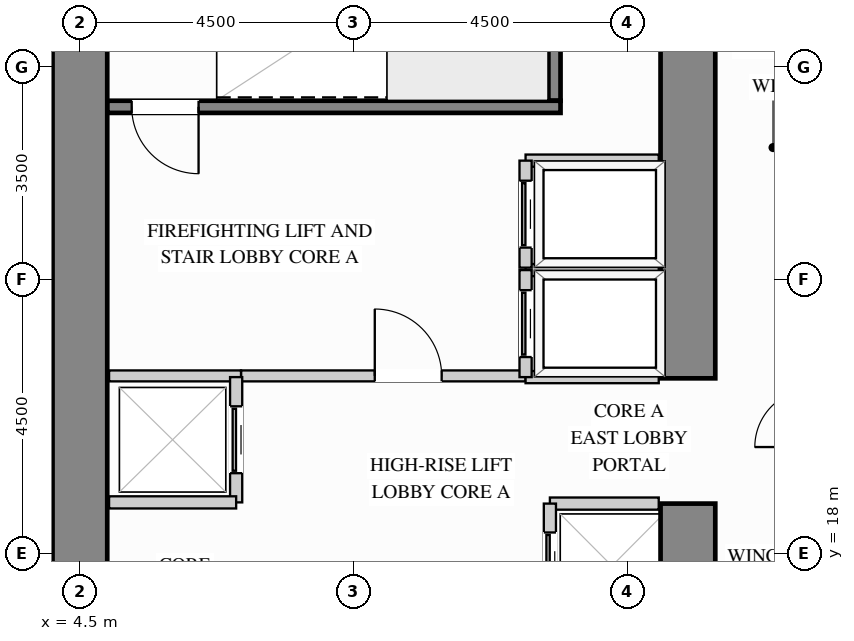
"""IFC4 building model, lengths in metres.
Left out: names, types, materials, properties, quantities, classifications, styles, units other than length and angle.
Written with IfcOpenShell. Run it as: python <this file> out.ifc"""

import sys

from ifc_helpers import new_model, si_unit, direction, frame, frame_2d, origin, place, context, subcontext, project, spatial, rectangle, extrude, source, transform, mapped, element, fill, save


model = new_model("IFC4")
c1 = context("Model", 3, precision=1e-05, world=origin(), true_north=direction((0.0, 1.0)))
c2 = subcontext(c1, "Body", "Model", "MODEL_VIEW")
j1 = project(units=[si_unit("LENGTHUNIT", "METRE"), si_unit("PLANEANGLEUNIT", "RADIAN")], contexts=[c1])
p1 = place(None, origin())
s1 = spatial("IfcSite", under=j1, at=p1, CompositionType="ELEMENT")
p2 = place(p1, origin())
s2 = spatial("IfcBuilding", under=s1, at=p2, CompositionType="ELEMENT")
p3 = place(p2, frame((0.0, 0.0, 58.5)))
s3 = spatial("IfcBuildingStorey", under=s2, at=p3, CompositionType="ELEMENT", Elevation=58.5)
m1 = source(origin(), c2, "Body", "SweptSolid", [
    extrude(rectangle(XDim=9.87, YDim=0.9, at=frame_2d((4.935, 0.0))), origin(), (0.0, 0.0, 1.0), 3.38),
])
p4 = place(p3, frame((14.5, 8.95, 0.0), z_axis=(0.0, 0.0, 1.0), x_axis=(0.0, 1.0, 0.0)))
e1 = element("IfcWall", 1, at=p4, inside=s3, PredefinedType="SHEAR", context=c2, shape_type="MappedRepresentation", body=[
    mapped(m1, transform((0.0, 0.0, 0.0), x_axis=(1.0, 0.0, 0.0), y_axis=(0.0, 1.0, 0.0), z_axis=(0.0, 0.0, 1.0))),
])
m2 = source(origin(), c2, "Body", "SweptSolid", [
    extrude(rectangle(XDim=8.17, YDim=0.9, at=frame_2d((4.085, 0.0))), origin(), (0.0, 0.0, 1.0), 3.38),
])
p5 = place(p3, frame((14.5, 20.88, 0.0), z_axis=(0.0, 0.0, 1.0), x_axis=(0.0, 1.0, 0.0)))
e2 = element("IfcWall", 2, at=p5, inside=s3, PredefinedType="SHEAR", context=c2, shape_type="MappedRepresentation", body=[
    mapped(m2, transform((0.0, 0.0, 0.0), x_axis=(1.0, 0.0, 0.0), y_axis=(0.0, 1.0, 0.0), z_axis=(0.0, 0.0, 1.0))),
])
m3 = source(origin(), c2, "Body", "SweptSolid", [
    extrude(rectangle(XDim=20.1, YDim=0.9, at=frame_2d((10.05, 0.0))), origin(), (0.0, 0.0, 1.0), 3.38),
])
p6 = place(p3, frame((4.5, 8.95, 0.0), z_axis=(0.0, 0.0, 1.0), x_axis=(0.0, 1.0, 0.0)))
e3 = element("IfcWall", 3, at=p6, inside=s3, PredefinedType="SHEAR", context=c2, shape_type="MappedRepresentation", body=[
    mapped(m3, transform((0.0, 0.0, 0.0), x_axis=(1.0, 0.0, 0.0), y_axis=(0.0, 1.0, 0.0), z_axis=(0.0, 0.0, 1.0))),
])
p7 = place(p3, frame((7.15, 20.92, 0.0), z_axis=(0.0, 0.0, 1.0), x_axis=(1.0, 0.0, 0.0)))
e4 = element("IfcWall", 4, at=p7, inside=s3, PredefinedType="PARTITIONING", context=c2, shape_type="SweptSolid", body=[
    extrude(rectangle(XDim=4.68, YDim=0.18, at=frame_2d((2.34, 0.0))), origin(), (0.0, 0.0, 1.0), 3.365),
])
p8 = place(p7, frame((2.2, 0.0, 0.0)))
e5 = element("IfcOpeningElement", 5, at=p8, cuts=e4, PredefinedType="OPENING", context=c2, shape_type="SweptSolid", body=[
    extrude(rectangle(XDim=1.1, YDim=2.15, at=frame_2d((0.55, 1.075))), frame((0.0, 0.1, 0.0), z_axis=(0.0, -1.0, 0.0), x_axis=(1.0, 0.0, 0.0)), (0.0, 0.0, 1.0), 0.2),
])
m4 = source(origin(), c2, "Body", "SweptSolid", [
    extrude(rectangle(XDim=2.17, YDim=0.18, at=frame_2d((1.085, 0.0))), origin(), (0.0, 0.0, 1.0), 3.365),
])
p9 = place(p3, frame((4.98, 20.92, 0.0), z_axis=(0.0, 0.0, 1.0), x_axis=(1.0, 0.0, 0.0)))
e6 = element("IfcWall", 6, at=p9, inside=s3, PredefinedType="PARTITIONING", context=c2, shape_type="MappedRepresentation", body=[
    mapped(m4, transform((0.0, 0.0, 0.0), x_axis=(1.0, 0.0, 0.0), y_axis=(0.0, 1.0, 0.0), z_axis=(0.0, 0.0, 1.0))),
])
m5 = source(origin(), c2, "Body", "SweptSolid", [
    extrude(rectangle(XDim=2.19, YDim=0.2, at=frame_2d((1.095, 0.0))), origin(), (0.0, 0.0, 1.0), 3.365),
])
for number, where, z_axis, x_axis in (
    (7, (11.83, 22.66, 0.0), (0.0, 0.0, 1.0), (1.0, 0.0, 0.0)),
    (8, (11.83, 20.9, 0.0), (0.0, 0.0, 1.0), (1.0, 0.0, 0.0)),
):
    element("IfcWall", number, at=place(p3, frame(where, z_axis=z_axis, x_axis=x_axis)), inside=s3, PredefinedType="PARTITIONING", context=c2, shape_type="MappedRepresentation", body=[
        mapped(m5, transform((0.0, 0.0, 0.0), x_axis=(1.0, 0.0, 0.0), y_axis=(0.0, 1.0, 0.0), z_axis=(0.0, 0.0, 1.0))),
    ])
p10 = place(p3, frame((11.83, 20.9, 0.0), z_axis=(0.0, 0.0, 1.0), x_axis=(0.0, 1.0, 0.0)))
e9 = element("IfcWall", 9, at=p10, inside=s3, PredefinedType="PARTITIONING", context=c2, shape_type="SweptSolid", body=[
    extrude(rectangle(XDim=1.76, YDim=0.2, at=frame_2d((0.88, 0.0))), origin(), (0.0, 0.0, 1.0), 3.365),
])
p11 = place(p10, frame((0.33, 0.0, 0.0)))
e10 = element("IfcOpeningElement", 10, at=p11, cuts=e9, PredefinedType="OPENING", context=c2, shape_type="SweptSolid", body=[
    extrude(rectangle(XDim=1.1, YDim=2.2, at=frame_2d((0.55, 1.1))), frame((0.0, 0.11, 0.0), z_axis=(0.0, -1.0, 0.0), x_axis=(1.0, 0.0, 0.0)), (0.0, 0.0, 1.0), 0.22),
])
p12 = place(p3, frame((11.83, 24.46, 0.0), z_axis=(0.0, 0.0, 1.0), x_axis=(1.0, 0.0, 0.0)))
e11 = element("IfcWall", 11, at=p12, inside=s3, PredefinedType="PARTITIONING", context=c2, shape_type="MappedRepresentation", body=[
    mapped(m5, transform((0.0, 0.0, 0.0), x_axis=(1.0, 0.0, 0.0), y_axis=(0.0, 1.0, 0.0), z_axis=(0.0, 0.0, 1.0))),
])
p13 = place(p3, frame((11.83, 22.7, 0.0), z_axis=(0.0, 0.0, 1.0), x_axis=(0.0, 1.0, 0.0)))
e12 = element("IfcWall", 12, at=p13, inside=s3, PredefinedType="PARTITIONING", context=c2, shape_type="SweptSolid", body=[
    extrude(rectangle(XDim=1.76, YDim=0.2, at=frame_2d((0.88, 0.0))), origin(), (0.0, 0.0, 1.0), 3.365),
])
p14 = place(p13, frame((0.33, 0.0, 0.0)))
e13 = element("IfcOpeningElement", 13, at=p14, cuts=e12, PredefinedType="OPENING", context=c2, shape_type="SweptSolid", body=[
    extrude(rectangle(XDim=1.1, YDim=2.2, at=frame_2d((0.55, 1.1))), frame((0.0, 0.11, 0.0), z_axis=(0.0, -1.0, 0.0), x_axis=(1.0, 0.0, 0.0)), (0.0, 0.0, 1.0), 0.22),
])
m6 = source(origin(), c2, "Body", "SweptSolid", [
    extrude(rectangle(XDim=1.79, YDim=0.2, at=frame_2d((0.895, 0.0))), origin(), (0.0, 0.0, 1.0), 3.365),
])
p15 = place(p3, frame((12.23, 18.82, 0.0), z_axis=(0.0, 0.0, 1.0), x_axis=(1.0, 0.0, 0.0)))
e14 = element("IfcWall", 14, at=p15, inside=s3, PredefinedType="PARTITIONING", context=c2, shape_type="MappedRepresentation", body=[
    mapped(m6, transform((0.0, 0.0, 0.0), x_axis=(1.0, 0.0, 0.0), y_axis=(0.0, 1.0, 0.0), z_axis=(0.0, 0.0, 1.0))),
])
p16 = place(p3, frame((12.23, 16.77, 0.0), z_axis=(0.0, 0.0, 1.0), x_axis=(0.0, 1.0, 0.0)))
e15 = element("IfcWall", 15, at=p16, inside=s3, PredefinedType="PARTITIONING", context=c2, shape_type="SweptSolid", body=[
    extrude(rectangle(XDim=2.05, YDim=0.2, at=frame_2d((1.025, 0.0))), origin(), (0.0, 0.0, 1.0), 3.365),
])
p17 = place(p16, frame((0.475, 0.0, 0.0)))
e16 = element("IfcOpeningElement", 16, at=p17, cuts=e15, PredefinedType="OPENING", context=c2, shape_type="SweptSolid", body=[
    extrude(rectangle(XDim=1.1, YDim=2.2, at=frame_2d((0.55, 1.1))), frame((0.0, 0.11, 0.0), z_axis=(0.0, -1.0, 0.0), x_axis=(1.0, 0.0, 0.0)), (0.0, 0.0, 1.0), 0.22),
])
p18 = place(p3, frame((7.07, 18.84, 0.0), z_axis=(0.0, 0.0, 1.0), x_axis=(0.0, 1.0, 0.0)))
e17 = element("IfcWall", 17, at=p18, inside=s3, PredefinedType="PARTITIONING", context=c2, shape_type="SweptSolid", body=[
    extrude(rectangle(XDim=2.06, YDim=0.2, at=frame_2d((1.03, 0.0))), origin(), (0.0, 0.0, 1.0), 3.365),
])
p19 = place(p18, frame((0.48, 0.0, 0.0)))
e18 = element("IfcOpeningElement", 18, at=p19, cuts=e17, PredefinedType="OPENING", context=c2, shape_type="SweptSolid", body=[
    extrude(rectangle(XDim=1.1, YDim=2.2, at=frame_2d((0.55, 1.1))), frame((0.0, 0.11, 0.0), z_axis=(0.0, -1.0, 0.0), x_axis=(1.0, 0.0, 0.0)), (0.0, 0.0, 1.0), 0.22),
])
m7 = source(origin(), c2, "Body", "SweptSolid", [
    extrude(rectangle(XDim=2.09, YDim=0.2, at=frame_2d((1.045, 0.0))), origin(), (0.0, 0.0, 1.0), 3.365),
])
p20 = place(p3, frame((4.98, 18.84, 0.0), z_axis=(0.0, 0.0, 1.0), x_axis=(1.0, 0.0, 0.0)))
e19 = element("IfcWall", 19, at=p20, inside=s3, PredefinedType="PARTITIONING", context=c2, shape_type="MappedRepresentation", body=[
    mapped(m7, transform((0.0, 0.0, 0.0), x_axis=(1.0, 0.0, 0.0), y_axis=(0.0, 1.0, 0.0), z_axis=(0.0, 0.0, 1.0))),
])
m8 = source(origin(), c2, "Body", "SweptSolid", [
    extrude(rectangle(XDim=3.603, YDim=0.2, at=frame_2d((1.802, 0.0))), origin(), (0.0, 0.0, 1.0), 3.38),
])
p21 = place(p3, frame((12.305, 25.445, 0.0), z_axis=(0.0, 0.0, 1.0), x_axis=(0.0, 1.0, 0.0)))
e20 = element("IfcWall", 20, at=p21, inside=s3, PredefinedType="SHEAR", context=c2, shape_type="MappedRepresentation", body=[
    mapped(m8, transform((0.0, 0.0, 0.0), x_axis=(1.0, 0.0, 0.0), y_axis=(0.0, 1.0, 0.0), z_axis=(0.0, 0.0, 1.0))),
])
p22 = place(p3, frame((4.952, 25.345, 0.0), z_axis=(0.0, 0.0, 1.0), x_axis=(1.0, 0.0, 0.0)))
e21 = element("IfcWall", 21, at=p22, inside=s3, PredefinedType="SHEAR", context=c2, shape_type="SweptSolid", body=[
    extrude(rectangle(XDim=7.453, YDim=0.2, at=frame_2d((3.727, 0.0))), origin(), (0.0, 0.0, 1.0), 3.38),
])
p23 = place(p22, frame((0.4, 0.0, 0.0)))
e22 = element("IfcOpeningElement", 22, at=p23, cuts=e21, PredefinedType="OPENING", context=c2, shape_type="SweptSolid", body=[
    extrude(rectangle(XDim=1.1, YDim=2.15, at=frame_2d((0.55, 1.075))), frame((0.0, 0.11, 0.0), z_axis=(0.0, -1.0, 0.0), x_axis=(1.0, 0.0, 0.0)), (0.0, 0.0, 1.0), 0.22),
])
m9 = source(origin(), c2, "Body", "SweptSolid", [
    extrude(rectangle(XDim=1.1, YDim=2.15, at=frame_2d((0.55, 1.075))), frame((0.0, 0.025, 0.0), z_axis=(0.0, -1.0, 0.0), x_axis=(1.0, 0.0, 0.0)), (0.0, 0.0, 1.0), 0.05),
])
p24 = place(p8, origin())
e23 = element("IfcDoor", 23, at=p24, inside=s3, OperationType="SINGLE_SWING_LEFT", PredefinedType="DOOR", context=c2, shape_type="MappedRepresentation", body=[
    mapped(m9, transform((0.0, 0.0, 0.0), x_axis=(1.0, 0.0, 0.0), y_axis=(0.0, 1.0, 0.0), z_axis=(0.0, 0.0, 1.0))),
])
fill(e5, e23)
m10 = source(origin(), c2, "Body", "SweptSolid", [
    extrude(rectangle(XDim=1.1, YDim=2.2, at=frame_2d((0.55, 1.1))), frame((0.0, 0.025, 0.0), z_axis=(0.0, -1.0, 0.0), x_axis=(1.0, 0.0, 0.0)), (0.0, 0.0, 1.0), 0.05),
])
p25 = place(p11, origin())
e24 = element("IfcDoor", 24, at=p25, inside=s3, OperationType="SLIDING_TO_LEFT", PredefinedType="DOOR", context=c2, shape_type="MappedRepresentation", body=[
    mapped(m10, transform((0.0, 0.0, 0.0), x_axis=(1.0, 0.0, 0.0), y_axis=(0.0, 1.0, 0.0), z_axis=(0.0, 0.0, 1.0))),
])
fill(e10, e24)
p26 = place(p14, origin())
e25 = element("IfcDoor", 25, at=p26, inside=s3, OperationType="SLIDING_TO_LEFT", PredefinedType="DOOR", context=c2, shape_type="MappedRepresentation", body=[
    mapped(m10, transform((0.0, 0.0, 0.0), x_axis=(1.0, 0.0, 0.0), y_axis=(0.0, 1.0, 0.0), z_axis=(0.0, 0.0, 1.0))),
])
fill(e13, e25)
p27 = place(p17, origin())
e26 = element("IfcDoor", 26, at=p27, inside=s3, OperationType="SLIDING_TO_LEFT", PredefinedType="DOOR", context=c2, shape_type="MappedRepresentation", body=[
    mapped(m10, transform((0.0, 0.0, 0.0), x_axis=(1.0, 0.0, 0.0), y_axis=(0.0, 1.0, 0.0), z_axis=(0.0, 0.0, 1.0))),
])
fill(e16, e26)
p28 = place(p19, origin())
e27 = element("IfcDoor", 27, at=p28, inside=s3, OperationType="SLIDING_TO_LEFT", PredefinedType="DOOR", context=c2, shape_type="MappedRepresentation", body=[
    mapped(m10, transform((0.0, 0.0, 0.0), x_axis=(1.0, 0.0, 0.0), y_axis=(0.0, 1.0, 0.0), z_axis=(0.0, 0.0, 1.0))),
])
fill(e18, e27)
m11 = source(origin(), c2, "Body", "SweptSolid", [
    extrude(rectangle(XDim=1.1, YDim=2.15, at=frame_2d((0.55, 1.075))), frame((0.0, 0.025, 0.0), z_axis=(0.0, -1.0, 0.0), x_axis=(1.0, 0.0, 0.0)), (0.0, 0.0, 1.0), 0.05),
])
p29 = place(p23, origin())
e28 = element("IfcDoor", 28, at=p29, inside=s3, OperationType="SINGLE_SWING_RIGHT", PredefinedType="DOOR", context=c2, shape_type="MappedRepresentation", body=[
    mapped(m11, transform((0.0, 0.0, 0.0), x_axis=(1.0, 0.0, 0.0), y_axis=(0.0, 1.0, 0.0), z_axis=(0.0, 0.0, 1.0))),
])
fill(e22, e28)
save(model, sys.argv[1])
